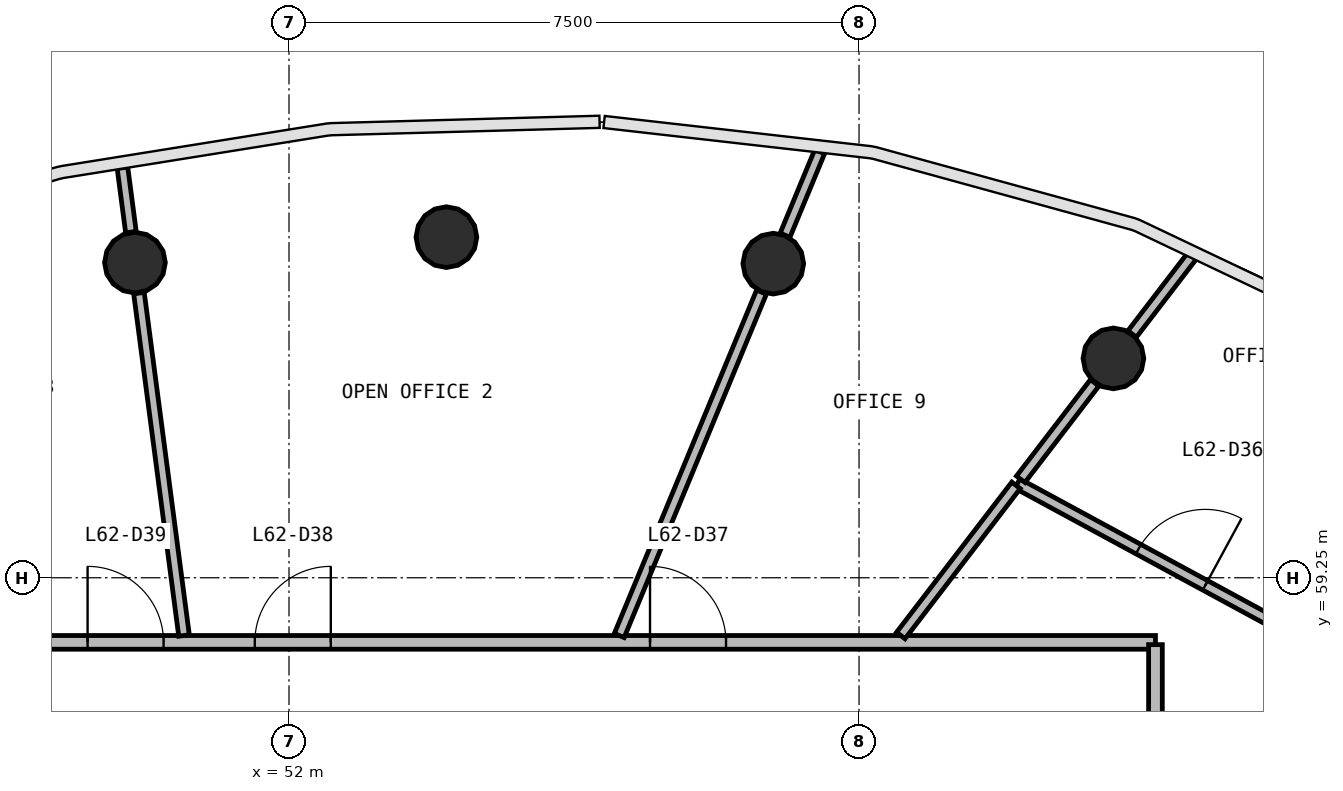
"""IFC4 building model, lengths in metres.
Left out: names, types, materials, properties, quantities, classifications, styles, units other than length and angle.
Written with IfcOpenShell. Run it as: python <this file> out.ifc"""

import sys

from ifc_helpers import new_model, si_unit, direction, frame, frame_2d, origin, origin_2d, place, context, subcontext, project, spatial, rectangle, circle, extrude, source, transform, mapped, element, fill, save


model = new_model("IFC4")
c1 = context("Model", 3, precision=1e-05, world=origin(), true_north=direction((0.0, 1.0)))
c2 = subcontext(c1, "Body", "Model", "MODEL_VIEW")
j1 = project(units=[si_unit("LENGTHUNIT", "METRE"), si_unit("PLANEANGLEUNIT", "RADIAN")], contexts=[c1])
p1 = place(None, origin())
s1 = spatial("IfcSite", under=j1, at=p1, CompositionType="ELEMENT")
p2 = place(p1, origin())
s2 = spatial("IfcBuilding", under=s1, at=p2, CompositionType="ELEMENT")
p3 = place(p2, frame((0.0, 0.0, 254.0)))
s3 = spatial("IfcBuildingStorey", under=s2, at=p3, CompositionType="ELEMENT", Elevation=254.0)
m1 = source(origin(), c2, "Body", "SweptSolid", [
    extrude(circle(Radius=0.4, at=origin_2d()), origin(), (0.0, 0.0, 1.0), 3.9),
])
for number, where, z_axis, x_axis in (
    (1, (62.847, 62.136, 0.0), (0.0, 0.0, 1.0), (1.0, 0.0, 0.0)),
    (2, (58.372, 63.383, 0.0), (0.0, 0.0, 1.0), (1.0, 0.0, 0.0)),
    (3, (54.071, 63.731, 0.0), (0.0, 0.0, 1.0), (1.0, 0.0, 0.0)),
    (4, (49.973, 63.396, 0.0), (0.0, 0.0, 1.0), (1.0, 0.0, 0.0)),
):
    element("IfcColumn", number, at=place(p3, frame(where, z_axis=z_axis, x_axis=x_axis)), inside=s3, PredefinedType="COLUMN", context=c2, shape_type="MappedRepresentation", body=[
        mapped(m1, transform((0.0, 0.0, 0.0), scale=1.0)),
    ])
p4 = place(p3, frame((40.6, 58.4, 0.0), z_axis=(0.0, 0.0, 1.0), x_axis=(1.0, 0.0, 0.0)))
e5 = element("IfcWall", 5, at=p4, inside=s3, PredefinedType="PARTITIONING", context=c2, shape_type="SweptSolid", body=[
    extrude(rectangle(XDim=22.8, YDim=0.18, at=frame_2d((11.4, 0.0))), origin(), (0.0, 0.0, 1.0), 2.88),
])
p5 = place(p4, frame((16.15, 0.0, 0.0)))
e6 = element("IfcOpeningElement", 6, at=p5, cuts=e5, PredefinedType="OPENING", context=c2, shape_type="SweptSolid", body=[
    extrude(rectangle(XDim=1.0, YDim=2.1, at=frame_2d((0.5, 1.05))), frame((0.0, 0.1, 0.0), z_axis=(0.0, -1.0, 0.0), x_axis=(1.0, 0.0, 0.0)), (0.0, 0.0, 1.0), 0.2),
])
p6 = place(p4, frame((10.95, 0.0, 0.0)))
e7 = element("IfcOpeningElement", 7, at=p6, cuts=e5, PredefinedType="OPENING", context=c2, shape_type="SweptSolid", body=[
    extrude(rectangle(XDim=1.0, YDim=2.1, at=frame_2d((0.5, 1.05))), frame((0.0, 0.1, 0.0), z_axis=(0.0, -1.0, 0.0), x_axis=(1.0, 0.0, 0.0)), (0.0, 0.0, 1.0), 0.2),
])
p7 = place(p4, frame((8.75, 0.0, 0.0)))
e8 = element("IfcOpeningElement", 8, at=p7, cuts=e5, PredefinedType="OPENING", context=c2, shape_type="SweptSolid", body=[
    extrude(rectangle(XDim=1.0, YDim=2.1, at=frame_2d((0.5, 1.05))), frame((0.0, 0.1, 0.0), z_axis=(0.0, -1.0, 0.0), x_axis=(1.0, 0.0, 0.0)), (0.0, 0.0, 1.0), 0.2),
])
p8 = place(p4, frame((5.75, 0.0, 0.0)))
e9 = element("IfcOpeningElement", 9, at=p8, cuts=e5, PredefinedType="OPENING", context=c2, shape_type="SweptSolid", body=[
    extrude(rectangle(XDim=1.0, YDim=2.1, at=frame_2d((0.5, 1.05))), frame((0.0, 0.1, 0.0), z_axis=(0.0, -1.0, 0.0), x_axis=(1.0, 0.0, 0.0)), (0.0, 0.0, 1.0), 0.2),
])
p9 = place(p3, frame((63.4, 58.37, 0.0), z_axis=(0.0, 0.0, 1.0), x_axis=(0.0, -1.0, 0.0)))
e10 = element("IfcWall", 10, at=p9, inside=s3, PredefinedType="PARTITIONING", context=c2, shape_type="SweptSolid", body=[
    extrude(rectangle(XDim=20.74, YDim=0.18, at=frame_2d((10.37, 0.0))), origin(), (0.0, 0.0, 1.0), 2.88),
])
p10 = place(p9, frame((15.49, 0.0, 0.0)))
e11 = element("IfcOpeningElement", 11, at=p10, cuts=e10, PredefinedType="OPENING", context=c2, shape_type="SweptSolid", body=[
    extrude(rectangle(XDim=1.0, YDim=2.1, at=frame_2d((0.5, 1.05))), frame((0.0, 0.1, 0.0), z_axis=(0.0, -1.0, 0.0), x_axis=(1.0, 0.0, 0.0)), (0.0, 0.0, 1.0), 0.2),
])
p11 = place(p9, frame((12.09, 0.0, 0.0)))
e12 = element("IfcOpeningElement", 12, at=p11, cuts=e10, PredefinedType="OPENING", context=c2, shape_type="SweptSolid", body=[
    extrude(rectangle(XDim=1.0, YDim=2.1, at=frame_2d((0.5, 1.05))), frame((0.0, 0.1, 0.0), z_axis=(0.0, -1.0, 0.0), x_axis=(1.0, 0.0, 0.0)), (0.0, 0.0, 1.0), 0.2),
])
p12 = place(p9, frame((9.89, 0.0, 0.0)))
e13 = element("IfcOpeningElement", 13, at=p12, cuts=e10, PredefinedType="OPENING", context=c2, shape_type="SweptSolid", body=[
    extrude(rectangle(XDim=1.0, YDim=2.1, at=frame_2d((0.5, 1.05))), frame((0.0, 0.1, 0.0), z_axis=(0.0, -1.0, 0.0), x_axis=(1.0, 0.0, 0.0)), (0.0, 0.0, 1.0), 0.2),
])
p13 = place(p3, frame((56.345, 58.49, 0.0), z_axis=(0.0, 0.0, 1.0), x_axis=(0.382689806821, 0.923876892099, 0.0)))
e14 = element("IfcWall", 14, at=p13, inside=s3, PredefinedType="PARTITIONING", context=c2, shape_type="SweptSolid", body=[
    extrude(rectangle(XDim=4.891, YDim=0.14, at=frame_2d((2.445, 0.0))), origin(), (0.0, 0.0, 1.0), 2.88),
])
p14 = place(p3, frame((50.619, 58.49, 0.0), z_axis=(0.0, 0.0, 1.0), x_axis=(-0.130505936446, 0.991447527887, 0.0)))
e15 = element("IfcWall", 15, at=p14, inside=s3, PredefinedType="PARTITIONING", context=c2, shape_type="SweptSolid", body=[
    extrude(rectangle(XDim=4.544, YDim=0.14, at=frame_2d((2.272, 0.0))), origin(), (0.0, 0.0, 1.0), 2.88),
])
p15 = place(p3, frame((61.584, 60.49, 0.0), z_axis=(0.0, 0.0, 1.0), x_axis=(0.879105698322, -0.476626867873, 0.0)))
e16 = element("IfcWall", 16, at=p15, inside=s3, PredefinedType="PARTITIONING", context=c2, shape_type="SweptSolid", body=[
    extrude(rectangle(XDim=4.461, YDim=0.14, at=frame_2d((2.231, 0.0))), origin(), (0.0, 0.0, 1.0), 2.88),
])
p16 = place(p15, frame((1.812, 0.0, 0.0)))
e17 = element("IfcOpeningElement", 17, at=p16, cuts=e16, PredefinedType="OPENING", context=c2, shape_type="SweptSolid", body=[
    extrude(rectangle(XDim=1.0, YDim=2.1, at=frame_2d((0.5, 1.05))), frame((0.0, 0.08, 0.0), z_axis=(0.0, -1.0, 0.0), x_axis=(1.0, 0.0, 0.0)), (0.0, 0.0, 1.0), 0.16),
])
p17 = place(p3, frame((60.049, 58.49, 0.0), z_axis=(0.0, 0.0, 1.0), x_axis=(0.608762828767, 0.793352266217, 0.0)))
e18 = element("IfcWall", 18, at=p17, inside=s3, PredefinedType="PARTITIONING", context=c2, shape_type="SweptSolid", body=[
    extrude(rectangle(XDim=2.49, YDim=0.14, at=frame_2d((1.245, 0.0))), origin(), (0.0, 0.0, 1.0), 2.88),
])
p18 = place(p3, frame((61.627, 60.546, 0.0), z_axis=(0.0, 0.0, 1.0), x_axis=(0.608803148953, 0.79332132571, 0.0)))
e19 = element("IfcWall", 19, at=p18, inside=s3, PredefinedType="PARTITIONING", context=c2, shape_type="SweptSolid", body=[
    extrude(rectangle(XDim=1.6, YDim=0.14, at=frame_2d((0.8, 0.0))), origin(), (0.0, 0.0, 1.0), 2.88),
])
p19 = place(p3, frame((63.093, 62.457, 0.0), z_axis=(0.0, 0.0, 1.0), x_axis=(0.608700288014, 0.793400251683, 0.0)))
e20 = element("IfcWall", 20, at=p19, inside=s3, PredefinedType="PARTITIONING", context=c2, shape_type="SweptSolid", body=[
    extrude(rectangle(XDim=1.297, YDim=0.14, at=frame_2d((0.648, 0.0))), origin(), (0.0, 0.0, 1.0), 2.88),
])
p20 = place(p3, frame((58.527, 63.757, 0.0), z_axis=(0.0, 0.0, 1.0), x_axis=(0.382762861593, 0.923846627847, 0.0)))
e21 = element("IfcWall", 21, at=p20, inside=s3, PredefinedType="PARTITIONING", context=c2, shape_type="SweptSolid", body=[
    extrude(rectangle(XDim=1.189, YDim=0.14, at=frame_2d((0.594, 0.0))), origin(), (0.0, 0.0, 1.0), 2.88),
])
p21 = place(p3, frame((49.92, 63.797, 0.0), z_axis=(0.0, 0.0, 1.0), x_axis=(-0.130720882624, 0.991419210448, 0.0)))
e22 = element("IfcWall", 22, at=p21, inside=s3, PredefinedType="PARTITIONING", context=c2, shape_type="SweptSolid", body=[
    extrude(rectangle(XDim=0.854, YDim=0.14, at=frame_2d((0.427, 0.0))), origin(), (0.0, 0.0, 1.0), 2.88),
])
m2 = source(origin(), c2, "Body", "SweptSolid", [
    extrude(rectangle(XDim=1.0, YDim=2.1, at=frame_2d((0.5, 1.05))), frame((0.0, 0.025, 0.0), z_axis=(0.0, -1.0, 0.0), x_axis=(1.0, 0.0, 0.0)), (0.0, 0.0, 1.0), 0.05),
])
p22 = place(p16, origin())
e23 = element("IfcDoor", 23, at=p22, inside=s3, OperationType="SINGLE_SWING_RIGHT", PredefinedType="DOOR", context=c2, shape_type="MappedRepresentation", body=[
    mapped(m2, transform((0.0, 0.0, 0.0), scale=1.0)),
])
fill(e17, e23)
p23 = place(p5, origin())
e24 = element("IfcDoor", 24, at=p23, inside=s3, OperationType="SINGLE_SWING_LEFT", PredefinedType="DOOR", context=c2, shape_type="MappedRepresentation", body=[
    mapped(m2, transform((0.0, 0.0, 0.0), scale=1.0)),
])
fill(e6, e24)
p24 = place(p6, origin())
e25 = element("IfcDoor", 25, at=p24, inside=s3, OperationType="SINGLE_SWING_RIGHT", PredefinedType="DOOR", context=c2, shape_type="MappedRepresentation", body=[
    mapped(m2, transform((0.0, 0.0, 0.0), scale=1.0)),
])
fill(e7, e25)
p25 = place(p7, origin())
e26 = element("IfcDoor", 26, at=p25, inside=s3, OperationType="SINGLE_SWING_LEFT", PredefinedType="DOOR", context=c2, shape_type="MappedRepresentation", body=[
    mapped(m2, transform((0.0, 0.0, 0.0), scale=1.0)),
])
fill(e8, e26)
save(model, sys.argv[1])
